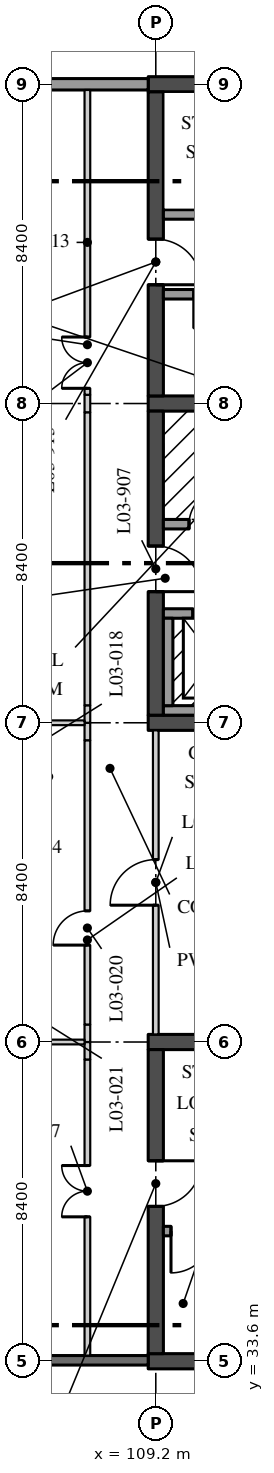
"""IFC4 building model, lengths in metres.
Left out: names, types, materials, properties, quantities, classifications, styles, units other than length and angle.
Written with IfcOpenShell. Run it as: python <this file> out.ifc"""

import sys

from ifc_helpers import new_model, si_unit, direction, frame, frame_2d, origin, place, context, subcontext, project, spatial, rectangle, extrude, element, fill, save


model = new_model("IFC4")
c1 = context("Model", 3, precision=1e-05, world=origin(), true_north=direction((0.0, 1.0)))
c2 = subcontext(c1, "Body", "Model", "MODEL_VIEW")
j1 = project(units=[si_unit("LENGTHUNIT", "METRE"), si_unit("PLANEANGLEUNIT", "RADIAN")], contexts=[c1])
p1 = place(None, origin())
s1 = spatial("IfcSite", under=j1, at=p1, CompositionType="ELEMENT")
p2 = place(p1, origin())
s2 = spatial("IfcBuilding", under=s1, at=p2, CompositionType="ELEMENT")
p3 = place(p2, frame((0.0, 0.0, 14.4)))
s3 = spatial("IfcBuildingStorey", under=s2, at=p3, CompositionType="ELEMENT", Elevation=14.4)
p4 = place(p3, frame((109.0, 50.4, 0.0), z_axis=(0.0, 0.0, 1.0), x_axis=(1.0, 0.0, 0.0)))
e1 = element("IfcWall", 1, at=p4, inside=s3, PredefinedType="SHEAR", context=c2, shape_type="SweptSolid", body=[
    extrude(rectangle(XDim=8.8, YDim=0.4, at=frame_2d((4.4, 0.0))), origin(), (0.0, 0.0, 1.0), 4.37),
])
p5 = place(p3, frame((109.0, 58.8, 0.0), z_axis=(0.0, 0.0, 1.0), x_axis=(1.0, 0.0, 0.0)))
e2 = element("IfcWall", 2, at=p5, inside=s3, PredefinedType="SHEAR", context=c2, shape_type="SweptSolid", body=[
    extrude(rectangle(XDim=8.8, YDim=0.4, at=frame_2d((4.4, 0.0))), origin(), (0.0, 0.0, 1.0), 4.37),
])
p6 = place(p5, frame((6.65, 0.0, 0.0)))
e3 = element("IfcOpeningElement", 3, at=p6, cuts=e2, PredefinedType="OPENING", context=c2, shape_type="SweptSolid", body=[
    extrude(rectangle(XDim=1.1, YDim=2.1, at=frame_2d((0.55, 1.05))), frame((0.0, 0.21, 0.0), z_axis=(0.0, -1.0, 0.0), x_axis=(1.0, 0.0, 0.0)), (0.0, 0.0, 1.0), 0.42),
])
p7 = place(p3, frame((109.2, 50.6, 0.0), z_axis=(0.0, 0.0, 1.0), x_axis=(0.0, 1.0, 0.0)))
e4 = element("IfcWall", 4, at=p7, inside=s3, PredefinedType="SHEAR", context=c2, shape_type="SweptSolid", body=[
    extrude(rectangle(XDim=8.0, YDim=0.4, at=frame_2d((4.0, 0.0))), origin(), (0.0, 0.0, 1.0), 4.37),
])
p8 = place(p7, frame((3.25, 0.0, 0.0)))
e5 = element("IfcOpeningElement", 5, at=p8, cuts=e4, PredefinedType="OPENING", context=c2, shape_type="SweptSolid", body=[
    extrude(rectangle(XDim=1.2, YDim=2.1, at=frame_2d((0.6, 1.05))), frame((0.0, 0.21, 0.0), z_axis=(0.0, -1.0, 0.0), x_axis=(1.0, 0.0, 0.0)), (0.0, 0.0, 1.0), 0.42),
])
p9 = place(p3, frame((109.4, 55.625, 0.0), z_axis=(0.0, 0.0, 1.0), x_axis=(1.0, 0.0, 0.0)))
e6 = element("IfcWall", 6, at=p9, inside=s3, PredefinedType="SOLIDWALL", context=c2, shape_type="SweptSolid", body=[
    extrude(rectangle(XDim=2.25, YDim=0.25, at=frame_2d((1.125, 0.0))), origin(), (0.0, 0.0, 1.0), 4.37),
])
p10 = place(p9, frame((0.675, 0.0, 0.0)))
e7 = element("IfcOpeningElement", 7, at=p10, cuts=e6, PredefinedType="OPENING", context=c2, shape_type="SweptSolid", body=[
    extrude(rectangle(XDim=0.9, YDim=2.1, at=frame_2d((0.45, 1.05))), frame((0.0, 0.135, 0.0), z_axis=(0.0, -1.0, 0.0), x_axis=(1.0, 0.0, 0.0)), (0.0, 0.0, 1.0), 0.27),
])
p11 = place(p3, frame((109.0, 67.2, 0.0), z_axis=(0.0, 0.0, 1.0), x_axis=(1.0, 0.0, 0.0)))
e8 = element("IfcWall", 8, at=p11, inside=s3, PredefinedType="SHEAR", context=c2, shape_type="SweptSolid", body=[
    extrude(rectangle(XDim=8.8, YDim=0.4, at=frame_2d((4.4, 0.0))), origin(), (0.0, 0.0, 1.0), 4.37),
])
p12 = place(p3, frame((109.2, 59.0, 0.0), z_axis=(0.0, 0.0, 1.0), x_axis=(0.0, 1.0, 0.0)))
e9 = element("IfcWall", 9, at=p12, inside=s3, PredefinedType="SHEAR", context=c2, shape_type="SweptSolid", body=[
    extrude(rectangle(XDim=8.0, YDim=0.4, at=frame_2d((4.0, 0.0))), origin(), (0.0, 0.0, 1.0), 4.37),
])
p13 = place(p12, frame((2.925, 0.0, 0.0)))
e10 = element("IfcOpeningElement", 10, at=p13, cuts=e9, PredefinedType="OPENING", context=c2, shape_type="SweptSolid", body=[
    extrude(rectangle(XDim=1.2, YDim=2.1, at=frame_2d((0.6, 1.05))), frame((0.0, 0.21, 0.0), z_axis=(0.0, -1.0, 0.0), x_axis=(1.0, 0.0, 0.0)), (0.0, 0.0, 1.0), 0.42),
])
p14 = place(p3, frame((117.4, 63.775, 0.0), z_axis=(0.0, 0.0, 1.0), x_axis=(-1.0, 0.0, 0.0)))
e11 = element("IfcWall", 11, at=p14, inside=s3, PredefinedType="SOLIDWALL", context=c2, shape_type="SweptSolid", body=[
    extrude(rectangle(XDim=8.0, YDim=0.25, at=frame_2d((4.0, 0.0))), origin(), (0.0, 0.0, 1.0), 4.37),
])
p15 = place(p14, frame((0.2, 0.0, 0.0)))
e12 = element("IfcOpeningElement", 12, at=p15, cuts=e11, PredefinedType="OPENING", context=c2, shape_type="SweptSolid", body=[
    extrude(rectangle(XDim=1.1, YDim=2.1, at=frame_2d((0.55, 1.05))), frame((0.0, 0.135, 0.0), z_axis=(0.0, -1.0, 0.0), x_axis=(1.0, 0.0, 0.0)), (0.0, 0.0, 1.0), 0.27),
])
p16 = place(p3, frame((114.75, 61.675, 0.0), z_axis=(0.0, 0.0, 1.0), x_axis=(-1.0, 0.0, 0.0)))
e13 = element("IfcWall", 13, at=p16, inside=s3, PredefinedType="SOLIDWALL", context=c2, shape_type="SweptSolid", body=[
    extrude(rectangle(XDim=5.35, YDim=0.25, at=frame_2d((2.675, 0.0))), origin(), (0.0, 0.0, 1.0), 4.37),
])
p17 = place(p16, frame((3.65, 0.0, 0.0)))
e14 = element("IfcOpeningElement", 14, at=p17, cuts=e13, PredefinedType="OPENING", context=c2, shape_type="SweptSolid", body=[
    extrude(rectangle(XDim=0.9, YDim=2.1, at=frame_2d((0.45, 1.05))), frame((0.0, 0.135, 0.0), z_axis=(0.0, -1.0, 0.0), x_axis=(1.0, 0.0, 0.0)), (0.0, 0.0, 1.0), 0.27),
])
p18 = place(p16, frame((0.9, 0.0, 0.0)))
e15 = element("IfcOpeningElement", 15, at=p18, cuts=e13, PredefinedType="OPENING", context=c2, shape_type="SweptSolid", body=[
    extrude(rectangle(XDim=0.8, YDim=2.1, at=frame_2d((0.4, 1.05))), frame((0.0, 0.135, 0.0), z_axis=(0.0, -1.0, 0.0), x_axis=(1.0, 0.0, 0.0)), (0.0, 0.0, 1.0), 0.27),
])
for number, where, z_axis, x_axis in (
    (16, (109.0, 33.6, 0.0), (0.0, 0.0, 1.0), (1.0, 0.0, 0.0)),
    (17, (109.0, 42.0, 0.0), (0.0, 0.0, 1.0), (1.0, 0.0, 0.0)),
):
    element("IfcWall", number, at=place(p3, frame(where, z_axis=z_axis, x_axis=x_axis)), inside=s3, PredefinedType="SHEAR", context=c2, shape_type="SweptSolid", body=[
        extrude(rectangle(XDim=8.8, YDim=0.4, at=frame_2d((4.4, 0.0))), origin(), (0.0, 0.0, 1.0), 4.37),
    ])
p19 = place(p3, frame((109.2, 33.8, 0.0), z_axis=(0.0, 0.0, 1.0), x_axis=(0.0, 1.0, 0.0)))
e18 = element("IfcWall", 18, at=p19, inside=s3, PredefinedType="SHEAR", context=c2, shape_type="SweptSolid", body=[
    extrude(rectangle(XDim=8.0, YDim=0.4, at=frame_2d((4.0, 0.0))), origin(), (0.0, 0.0, 1.0), 4.37),
])
p20 = place(p19, frame((3.875, 0.0, 0.0)))
e19 = element("IfcOpeningElement", 19, at=p20, cuts=e18, PredefinedType="OPENING", context=c2, shape_type="SweptSolid", body=[
    extrude(rectangle(XDim=1.2, YDim=2.1, at=frame_2d((0.6, 1.05))), frame((0.0, 0.21, 0.0), z_axis=(0.0, -1.0, 0.0), x_axis=(1.0, 0.0, 0.0)), (0.0, 0.0, 1.0), 0.42),
])
p21 = place(p3, frame((109.4, 37.025, 0.0), z_axis=(0.0, 0.0, 1.0), x_axis=(1.0, 0.0, 0.0)))
e20 = element("IfcWall", 20, at=p21, inside=s3, PredefinedType="SOLIDWALL", context=c2, shape_type="SweptSolid", body=[
    extrude(rectangle(XDim=8.0, YDim=0.25, at=frame_2d((4.0, 0.0))), origin(), (0.0, 0.0, 1.0), 4.37),
])
p22 = place(p21, frame((0.2, 0.0, 0.0)))
e21 = element("IfcOpeningElement", 21, at=p22, cuts=e20, PredefinedType="OPENING", context=c2, shape_type="SweptSolid", body=[
    extrude(rectangle(XDim=1.1, YDim=2.1, at=frame_2d((0.55, 1.05))), frame((0.0, 0.135, 0.0), z_axis=(0.0, -1.0, 0.0), x_axis=(1.0, 0.0, 0.0)), (0.0, 0.0, 1.0), 0.27),
])
p23 = place(p3, frame((109.4, 53.275, 0.0), z_axis=(0.0, 0.0, 1.0), x_axis=(1.0, 0.0, 0.0)))
e22 = element("IfcWall", 22, at=p23, inside=s3, PredefinedType="SOLIDWALL", context=c2, shape_type="SweptSolid", body=[
    extrude(rectangle(XDim=2.65, YDim=0.25, at=frame_2d((1.325, 0.0))), origin(), (0.0, 0.0, 1.0), 4.37),
])
p24 = place(p23, frame((0.775, 0.0, 0.0)))
e23 = element("IfcOpeningElement", 23, at=p24, cuts=e22, PredefinedType="OPENING", context=c2, shape_type="SweptSolid", body=[
    extrude(rectangle(XDim=1.1, YDim=2.1, at=frame_2d((0.55, 1.05))), frame((0.0, 0.135, 0.0), z_axis=(0.0, -1.0, 0.0), x_axis=(1.0, 0.0, 0.0)), (0.0, 0.0, 1.0), 0.27),
])
p25 = place(p3, frame((109.4, 50.725, 0.0), z_axis=(0.0, 0.0, 1.0), x_axis=(1.0, 0.0, 0.0)))
e24 = element("IfcWall", 24, at=p25, inside=s3, PredefinedType="SOLIDWALL", context=c2, shape_type="SweptSolid", body=[
    extrude(rectangle(XDim=2.65, YDim=0.25, at=frame_2d((1.325, 0.0))), origin(), (0.0, 0.0, 1.0), 4.37),
])
p26 = place(p3, frame((109.525, 50.85, 0.0), z_axis=(0.0, 0.0, 1.0), x_axis=(0.0, 1.0, 0.0)))
e25 = element("IfcWall", 25, at=p26, inside=s3, PredefinedType="SOLIDWALL", context=c2, shape_type="SweptSolid", body=[
    extrude(rectangle(XDim=2.3, YDim=0.25, at=frame_2d((1.15, 0.0))), origin(), (0.0, 0.0, 1.0), 4.37),
])
p27 = place(p3, frame((109.2, 42.2, 0.0), z_axis=(0.0, 0.0, 1.0), x_axis=(0.0, 1.0, 0.0)))
e26 = element("IfcWall", 26, at=p27, inside=s3, PredefinedType="PARTITIONING", context=c2, shape_type="SweptSolid", body=[
    extrude(rectangle(XDim=8.0, YDim=0.15, at=frame_2d((4.0, 0.0))), origin(), (0.0, 0.0, 1.0), 3.746),
])
p28 = place(p27, frame((3.4, 0.0, 0.0)))
e27 = element("IfcOpeningElement", 27, at=p28, cuts=e26, PredefinedType="OPENING", context=c2, shape_type="SweptSolid", body=[
    extrude(rectangle(XDim=1.2, YDim=2.4, at=frame_2d((0.6, 1.2))), frame((0.0, 0.085, 0.0), z_axis=(0.0, -1.0, 0.0), x_axis=(1.0, 0.0, 0.0)), (0.0, 0.0, 1.0), 0.17),
])
p29 = place(p3, frame((107.4, 33.75, 0.0), z_axis=(0.0, 0.0, 1.0), x_axis=(0.0, 1.0, 0.0)))
e28 = element("IfcWall", 28, at=p29, inside=s3, PredefinedType="PARTITIONING", context=c2, shape_type="SweptSolid", body=[
    extrude(rectangle(XDim=7.79, YDim=0.15, at=frame_2d((3.895, 0.0))), origin(), (0.0, 0.0, 1.0), 4.37),
])
p30 = place(p29, frame((3.65, 0.0, 0.0)))
e29 = element("IfcOpeningElement", 29, at=p30, cuts=e28, PredefinedType="OPENING", context=c2, shape_type="SweptSolid", body=[
    extrude(rectangle(XDim=1.35, YDim=2.1, at=frame_2d((0.675, 1.05))), frame((0.0, 0.085, 0.0), z_axis=(0.0, -1.0, 0.0), x_axis=(1.0, 0.0, 0.0)), (0.0, 0.0, 1.0), 0.17),
])
for number, where, z_axis, x_axis in (
    (30, (107.4, 41.54, 0.0), (0.0, 0.0, 1.0), (0.0, 1.0, 0.0)),
    (31, (107.4, 42.0, 0.0), (0.0, 0.0, 1.0), (0.0, 1.0, 0.0)),
):
    element("IfcWall", number, at=place(p3, frame(where, z_axis=z_axis, x_axis=x_axis)), inside=s3, PredefinedType="PARTITIONING", context=c2, shape_type="SweptSolid", body=[
        extrude(rectangle(XDim=0.46, YDim=0.15, at=frame_2d((0.23, 0.0))), origin(), (0.0, 0.0, 1.0), 3.746),
    ])
p31 = place(p3, frame((107.4, 42.46, 0.0), z_axis=(0.0, 0.0, 1.0), x_axis=(0.0, 1.0, 0.0)))
e32 = element("IfcWall", 32, at=p31, inside=s3, PredefinedType="PARTITIONING", context=c2, shape_type="SweptSolid", body=[
    extrude(rectangle(XDim=7.48, YDim=0.15, at=frame_2d((3.74, 0.0))), origin(), (0.0, 0.0, 1.0), 4.37),
])
p32 = place(p31, frame((2.09, 0.0, 0.0)))
e33 = element("IfcOpeningElement", 33, at=p32, cuts=e32, PredefinedType="OPENING", context=c2, shape_type="SweptSolid", body=[
    extrude(rectangle(XDim=0.9, YDim=2.1, at=frame_2d((0.45, 1.05))), frame((0.0, 0.085, 0.0), z_axis=(0.0, -1.0, 0.0), x_axis=(1.0, 0.0, 0.0)), (0.0, 0.0, 1.0), 0.17),
])
p33 = place(p3, frame((107.4, 49.94, 0.0), z_axis=(0.0, 0.0, 1.0), x_axis=(0.0, 1.0, 0.0)))
e34 = element("IfcWall", 34, at=p33, inside=s3, PredefinedType="PARTITIONING", context=c2, shape_type="SweptSolid", body=[
    extrude(rectangle(XDim=0.46, YDim=0.15, at=frame_2d((0.23, 0.0))), origin(), (0.0, 0.0, 1.0), 3.746),
])
p34 = place(p3, frame((107.4, 50.4, 0.0), z_axis=(0.0, 0.0, 1.0), x_axis=(0.0, 1.0, 0.0)))
e35 = element("IfcWall", 35, at=p34, inside=s3, PredefinedType="PARTITIONING", context=c2, shape_type="SweptSolid", body=[
    extrude(rectangle(XDim=0.46, YDim=0.15, at=frame_2d((0.23, 0.0))), origin(), (0.0, 0.0, 1.0), 3.746),
])
p35 = place(p3, frame((107.4, 50.86, 0.0), z_axis=(0.0, 0.0, 1.0), x_axis=(0.0, 1.0, 0.0)))
e36 = element("IfcWall", 36, at=p35, inside=s3, PredefinedType="PARTITIONING", context=c2, shape_type="SweptSolid", body=[
    extrude(rectangle(XDim=7.71, YDim=0.15, at=frame_2d((3.855, 0.0))), origin(), (0.0, 0.0, 1.0), 4.37),
])
p36 = place(p3, frame((107.4, 58.57, 0.0), z_axis=(0.0, 0.0, 1.0), x_axis=(0.0, 1.0, 0.0)))
e37 = element("IfcWall", 37, at=p36, inside=s3, PredefinedType="PARTITIONING", context=c2, shape_type="SweptSolid", body=[
    extrude(rectangle(XDim=0.46, YDim=0.15, at=frame_2d((0.23, 0.0))), origin(), (0.0, 0.0, 1.0), 3.746),
])
p37 = place(p3, frame((107.4, 59.03, 0.0), z_axis=(0.0, 0.0, 1.0), x_axis=(0.0, 1.0, 0.0)))
e38 = element("IfcWall", 38, at=p37, inside=s3, PredefinedType="PARTITIONING", context=c2, shape_type="SweptSolid", body=[
    extrude(rectangle(XDim=8.02, YDim=0.15, at=frame_2d((4.01, 0.0))), origin(), (0.0, 0.0, 1.0), 4.37),
])
p38 = place(p37, frame((0.17, 0.0, 0.0)))
e39 = element("IfcOpeningElement", 39, at=p38, cuts=e38, PredefinedType="OPENING", context=c2, shape_type="SweptSolid", body=[
    extrude(rectangle(XDim=1.35, YDim=2.1, at=frame_2d((0.675, 1.05))), frame((0.0, 0.085, 0.0), z_axis=(0.0, -1.0, 0.0), x_axis=(1.0, 0.0, 0.0)), (0.0, 0.0, 1.0), 0.17),
])
for number, where, z_axis, x_axis in (
    (40, (105.0, 42.0, 0.0), (0.0, 0.0, 1.0), (1.0, 0.0, 0.0)),
    (41, (105.0, 50.4, 0.0), (0.0, 0.0, 1.0), (1.0, 0.0, 0.0)),
):
    element("IfcWall", number, at=place(p3, frame(where, z_axis=z_axis, x_axis=x_axis)), inside=s3, PredefinedType="PARTITIONING", context=c2, shape_type="SweptSolid", body=[
        extrude(rectangle(XDim=2.325, YDim=0.125, at=frame_2d((1.163, 0.0))), origin(), (0.0, 0.0, 1.0), 3.746),
    ])
p39 = place(p3, frame((100.802, 33.625, 0.0), z_axis=(0.0, 0.0, 1.0), x_axis=(1.0, 0.0, 0.0)))
e42 = element("IfcWall", 42, at=p39, inside=s3, PredefinedType="SOLIDWALL", context=c2, shape_type="SweptSolid", body=[
    extrude(rectangle(XDim=8.198, YDim=0.25, at=frame_2d((4.099, 0.0))), origin(), (0.0, 0.0, 1.0), 3.746),
])
p40 = place(p39, frame((0.898, 0.0, 0.9)))
e43 = element("IfcOpeningElement", 43, at=p40, cuts=e42, PredefinedType="OPENING", context=c2, shape_type="SweptSolid", body=[
    extrude(rectangle(XDim=2.4, YDim=2.1, at=frame_2d((1.2, 1.05))), frame((0.0, 0.135, 0.0), z_axis=(0.0, -1.0, 0.0), x_axis=(1.0, 0.0, 0.0)), (0.0, 0.0, 1.0), 0.27),
])
p41 = place(p3, frame((109.0, 67.2, 0.0), z_axis=(0.0, 0.0, 1.0), x_axis=(-1.0, 0.0, 0.0)))
e44 = element("IfcWall", 44, at=p41, inside=s3, PredefinedType="SOLIDWALL", context=c2, shape_type="SweptSolid", body=[
    extrude(rectangle(XDim=8.198, YDim=0.3, at=frame_2d((4.099, 0.0))), origin(), (0.0, 0.0, 1.0), 3.746),
])
p42 = place(p8, frame((1.2, 0.0, 0.0), z_axis=(0.0, 0.0, 1.0), x_axis=(-1.0, 0.0, 0.0)))
e45 = element("IfcDoor", 45, at=p42, inside=s3, OperationType="SINGLE_SWING_LEFT", PredefinedType="DOOR", context=c2, shape_type="SweptSolid", body=[
    extrude(rectangle(XDim=1.2, YDim=2.1, at=frame_2d((0.6, 1.05))), frame((0.0, 0.035, 0.0), z_axis=(0.0, -1.0, 0.0), x_axis=(1.0, 0.0, 0.0)), (0.0, 0.0, 1.0), 0.07),
])
fill(e5, e45)
p43 = place(p10, origin())
e46 = element("IfcDoor", 46, at=p43, inside=s3, OperationType="SINGLE_SWING_LEFT", PredefinedType="DOOR", context=c2, shape_type="SweptSolid", body=[
    extrude(rectangle(XDim=0.9, YDim=2.1, at=frame_2d((0.45, 1.05))), frame((0.0, 0.05, 0.0), z_axis=(0.0, -1.0, 0.0), x_axis=(1.0, 0.0, 0.0)), (0.0, 0.0, 1.0), 0.1),
])
fill(e7, e46)
p44 = place(p13, frame((1.2, 0.0, 0.0), z_axis=(0.0, 0.0, 1.0), x_axis=(-1.0, 0.0, 0.0)))
e47 = element("IfcDoor", 47, at=p44, inside=s3, OperationType="SINGLE_SWING_LEFT", PredefinedType="DOOR", context=c2, shape_type="SweptSolid", body=[
    extrude(rectangle(XDim=1.2, YDim=2.1, at=frame_2d((0.6, 1.05))), frame((0.0, 0.035, 0.0), z_axis=(0.0, -1.0, 0.0), x_axis=(1.0, 0.0, 0.0)), (0.0, 0.0, 1.0), 0.07),
])
fill(e10, e47)
p45 = place(p20, frame((1.2, 0.0, 0.0), z_axis=(0.0, 0.0, 1.0), x_axis=(-1.0, 0.0, 0.0)))
e48 = element("IfcDoor", 48, at=p45, inside=s3, OperationType="SINGLE_SWING_RIGHT", PredefinedType="DOOR", context=c2, shape_type="SweptSolid", body=[
    extrude(rectangle(XDim=1.2, YDim=2.1, at=frame_2d((0.6, 1.05))), frame((0.0, 0.035, 0.0), z_axis=(0.0, -1.0, 0.0), x_axis=(1.0, 0.0, 0.0)), (0.0, 0.0, 1.0), 0.07),
])
fill(e19, e48)
p46 = place(p22, frame((1.1, 0.0, 0.0), z_axis=(0.0, 0.0, 1.0), x_axis=(-1.0, 0.0, 0.0)))
e49 = element("IfcDoor", 49, at=p46, inside=s3, OperationType="SINGLE_SWING_LEFT", PredefinedType="DOOR", context=c2, shape_type="SweptSolid", body=[
    extrude(rectangle(XDim=1.1, YDim=2.1, at=frame_2d((0.55, 1.05))), frame((0.0, 0.035, 0.0), z_axis=(0.0, -1.0, 0.0), x_axis=(1.0, 0.0, 0.0)), (0.0, 0.0, 1.0), 0.07),
])
fill(e21, e49)
p47 = place(p24, origin())
e50 = element("IfcDoor", 50, at=p47, inside=s3, OperationType="DOUBLE_DOOR_SLIDING", PredefinedType="DOOR", context=c2, shape_type="SweptSolid", body=[
    extrude(rectangle(XDim=1.1, YDim=2.1, at=frame_2d((0.55, 1.05))), frame((0.0, 0.04, 0.0), z_axis=(0.0, -1.0, 0.0), x_axis=(1.0, 0.0, 0.0)), (0.0, 0.0, 1.0), 0.08),
])
fill(e23, e50)
p48 = place(p28, origin())
e51 = element("IfcDoor", 51, at=p48, inside=s3, OperationType="SINGLE_SWING_RIGHT", PredefinedType="DOOR", context=c2, shape_type="SweptSolid", body=[
    extrude(rectangle(XDim=1.2, YDim=2.4, at=frame_2d((0.6, 1.2))), frame((0.0, 0.025, 0.0), z_axis=(0.0, -1.0, 0.0), x_axis=(1.0, 0.0, 0.0)), (0.0, 0.0, 1.0), 0.05),
])
fill(e27, e51)
p49 = place(p30, origin())
e52 = element("IfcDoor", 52, at=p49, inside=s3, OperationType="DOUBLE_DOOR_SINGLE_SWING", PredefinedType="DOOR", context=c2, shape_type="SweptSolid", body=[
    extrude(rectangle(XDim=1.35, YDim=2.1, at=frame_2d((0.675, 1.05))), frame((0.0, 0.025, 0.0), z_axis=(0.0, -1.0, 0.0), x_axis=(1.0, 0.0, 0.0)), (0.0, 0.0, 1.0), 0.05),
])
fill(e29, e52)
p50 = place(p32, origin())
e53 = element("IfcDoor", 53, at=p50, inside=s3, OperationType="SINGLE_SWING_RIGHT", PredefinedType="DOOR", context=c2, shape_type="SweptSolid", body=[
    extrude(rectangle(XDim=0.9, YDim=2.1, at=frame_2d((0.45, 1.05))), frame((0.0, 0.025, 0.0), z_axis=(0.0, -1.0, 0.0), x_axis=(1.0, 0.0, 0.0)), (0.0, 0.0, 1.0), 0.05),
])
fill(e33, e53)
p51 = place(p38, origin())
e54 = element("IfcDoor", 54, at=p51, inside=s3, OperationType="DOUBLE_DOOR_SINGLE_SWING", PredefinedType="DOOR", context=c2, shape_type="SweptSolid", body=[
    extrude(rectangle(XDim=1.35, YDim=2.1, at=frame_2d((0.675, 1.05))), frame((0.0, 0.025, 0.0), z_axis=(0.0, -1.0, 0.0), x_axis=(1.0, 0.0, 0.0)), (0.0, 0.0, 1.0), 0.05),
])
fill(e39, e54)
save(model, sys.argv[1])
